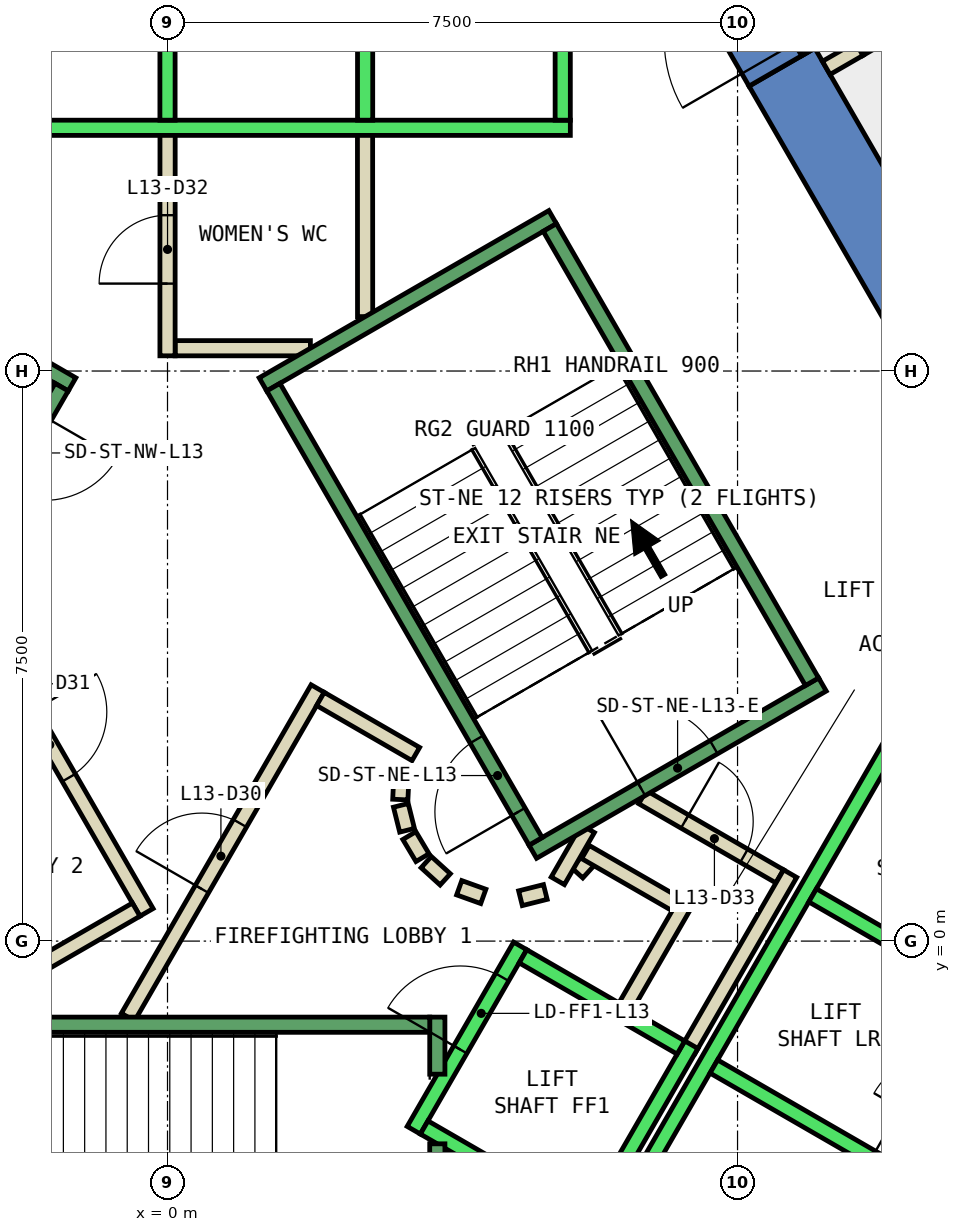
"""IFC4 building model, lengths in metres.
Left out: names, types, materials, properties, quantities, classifications, styles, units other than length and angle.
Written with IfcOpenShell. Run it as: python <this file> out.ifc"""

import sys

from ifc_helpers import new_model, si_unit, direction, frame, frame_2d, origin, place, context, subcontext, project, spatial, polyline, rectangle, outline, extrude, element, fill, save


model = new_model("IFC4")
c1 = context("Model", 3, precision=1e-05, world=origin(), true_north=direction((0.0, 1.0)))
c2 = subcontext(c1, "Body", "Model", "MODEL_VIEW")
j1 = project(units=[si_unit("LENGTHUNIT", "METRE"), si_unit("PLANEANGLEUNIT", "RADIAN")], contexts=[c1])
p1 = place(None, origin())
s1 = spatial("IfcSite", under=j1, at=p1, CompositionType="ELEMENT")
p2 = place(p1, origin())
s2 = spatial("IfcBuilding", under=s1, at=p2, CompositionType="ELEMENT")
p3 = place(p2, frame((0.0, 0.0, 64.4)))
s3 = spatial("IfcBuildingStorey", under=s2, at=p3, CompositionType="ELEMENT", Elevation=64.4)
p4 = place(p3, frame((0.0, 0.0, -0.4)))
e1 = element("IfcWall", 1, at=p4, inside=s3, PredefinedType="SHEAR", context=c2, shape_type="SweptSolid", body=[
    extrude(outline(polyline([(8.517, 11.748), (7.651, 11.248), (12.702, 2.5), (13.856, 2.5), (8.517, 11.748)])), origin(), (0.0, 0.0, 1.0), 4.2),
])
p5 = place(p3, frame((0.0, 0.0, 3.6)))
e2 = element("IfcWall", 2, at=p5, inside=s3, PredefinedType="SHEAR", context=c2, shape_type="SweptSolid", body=[
    extrude(outline(polyline([(7.517, 13.48), (6.651, 12.98), (7.651, 11.248), (8.517, 11.748), (7.517, 13.48)])), origin(), (0.0, 0.0, 1.0), 0.2),
])
p6 = place(p3, frame((0.0, 0.0, -0.4)))
e3 = element("IfcWall", 3, at=p6, inside=s3, PredefinedType="SHEAR", context=c2, shape_type="SweptSolid", body=[
    extrude(outline(polyline([(10.717, -2.937), (9.851, -2.437), (9.201, -3.563), (10.067, -4.063), (10.717, -2.937)])), origin(), (0.0, 0.0, 1.0), 4.2),
])
p7 = place(p3, frame((14.316, 14.75, 0.0), z_axis=(0.0, 0.0, 1.0), x_axis=(-0.865981716183, -0.500075661512, 0.0)))
e4 = element("IfcWall", 4, at=p7, inside=s3, PredefinedType="PARTITIONING", context=c2, shape_type="SweptSolid", body=[
    extrude(rectangle(XDim=6.023, YDim=0.2, at=frame_2d((3.011, 0.0))), origin(), (0.0, 0.0, 1.0), 3.8),
])
p8 = place(p7, frame((2.761, 0.0, 0.0)))
e5 = element("IfcOpeningElement", 5, at=p8, cuts=e4, PredefinedType="OPENING", context=c2, shape_type="SweptSolid", body=[
    extrude(rectangle(XDim=1.0, YDim=2.1, at=frame_2d((0.5, 1.05))), frame((0.0, 0.11, 0.0), z_axis=(0.0, -1.0, 0.0), x_axis=(1.0, 0.0, 0.0)), (0.0, 0.0, 1.0), 0.22),
])
p9 = place(p3, frame((1.88, 7.8, 0.0), z_axis=(0.0, 0.0, 1.0), x_axis=(-1.0, 0.0, 0.0)))
e6 = element("IfcWall", 6, at=p9, inside=s3, PredefinedType="PARTITIONING", context=c2, shape_type="SweptSolid", body=[
    extrude(rectangle(XDim=1.78, YDim=0.2, at=frame_2d((0.89, 0.0))), origin(), (0.0, 0.0, 1.0), 3.8),
])
p10 = place(p3, frame((0.0, 7.7, 0.0), z_axis=(0.0, 0.0, 1.0), x_axis=(0.000325520816, 0.999999947018, 0.0)))
e7 = element("IfcWall", 7, at=p10, inside=s3, PredefinedType="PARTITIONING", context=c2, shape_type="SweptSolid", body=[
    extrude(rectangle(XDim=3.0, YDim=0.2, at=frame_2d((1.5, 0.0))), origin(), (0.0, 0.0, 1.0), 3.8),
])
p11 = place(p10, frame((0.95, 0.0, 0.0)))
e8 = element("IfcOpeningElement", 8, at=p11, cuts=e7, PredefinedType="OPENING", context=c2, shape_type="SweptSolid", body=[
    extrude(rectangle(XDim=0.9, YDim=2.1, at=frame_2d((0.45, 1.05))), frame((0.0, 0.11, 0.0), z_axis=(0.0, -1.0, 0.0), x_axis=(1.0, 0.0, 0.0)), (0.0, 0.0, 1.0), 0.22),
])
p12 = place(p3, frame((2.599, 10.7, 0.0), z_axis=(0.0, 0.0, 1.0), x_axis=(0.000393159002, -0.999999922713, 0.0)))
e9 = element("IfcWall", 9, at=p12, inside=s3, PredefinedType="PARTITIONING", context=c2, shape_type="SweptSolid", body=[
    extrude(rectangle(XDim=2.484, YDim=0.2, at=frame_2d((1.242, 0.0))), origin(), (0.0, 0.0, 1.0), 3.8),
])
p13 = place(p3, frame((5.39, 0.898, 0.0), z_axis=(0.0, 0.0, 1.0), x_axis=(0.673828488714, 0.738887791073, 0.0)))
e10 = element("IfcWall", 10, at=p13, inside=s3, PredefinedType="PARTITIONING", context=c2, shape_type="SweptSolid", body=[
    extrude(rectangle(XDim=0.263, YDim=0.2, at=frame_2d((0.131, 0.0))), origin(), (0.0, 0.0, 1.0), 3.8),
])
p14 = place(p3, frame((5.499, 1.172, 0.0), z_axis=(0.0, 0.0, 1.0), x_axis=(0.866333505267, -0.499465972466, 0.0)))
e11 = element("IfcWall", 11, at=p14, inside=s3, PredefinedType="PARTITIONING", context=c2, shape_type="SweptSolid", body=[
    extrude(rectangle(XDim=1.374, YDim=0.2, at=frame_2d((0.687, 0.0))), origin(), (0.0, 0.0, 1.0), 3.8),
])
p15 = place(p3, frame((6.826, 0.522, 0.0), z_axis=(0.0, 0.0, 1.0), x_axis=(-0.500016722714, -0.866015748706, 0.0)))
e12 = element("IfcWall", 12, at=p15, inside=s3, PredefinedType="PARTITIONING", context=c2, shape_type="SweptSolid", body=[
    extrude(rectangle(XDim=1.7, YDim=0.2, at=frame_2d((0.85, 0.0))), origin(), (0.0, 0.0, 1.0), 3.8),
])
p16 = place(p3, frame((6.25, 1.894, 0.0), z_axis=(0.0, 0.0, 1.0), x_axis=(0.866043184279, -0.499969202016, 0.0)))
e13 = element("IfcWall", 13, at=p16, inside=s3, PredefinedType="PARTITIONING", context=c2, shape_type="SweptSolid", body=[
    extrude(rectangle(XDim=2.084, YDim=0.2, at=frame_2d((1.042, 0.0))), origin(), (0.0, 0.0, 1.0), 3.8),
])
p17 = place(p16, frame((0.642, 0.0, 0.0)))
e14 = element("IfcOpeningElement", 14, at=p17, cuts=e13, PredefinedType="OPENING", context=c2, shape_type="SweptSolid", body=[
    extrude(rectangle(XDim=0.9, YDim=2.1, at=frame_2d((0.45, 1.05))), frame((0.0, 0.11, 0.0), z_axis=(0.0, -1.0, 0.0), x_axis=(1.0, 0.0, 0.0)), (0.0, 0.0, 1.0), 0.22),
])
p18 = place(p3, frame((8.192, 0.888, 0.0), z_axis=(0.0, 0.0, 1.0), x_axis=(-0.499940625693, -0.866059680843, 0.0)))
e15 = element("IfcWall", 15, at=p18, inside=s3, PredefinedType="PARTITIONING", context=c2, shape_type="SweptSolid", body=[
    extrude(rectangle(XDim=2.68, YDim=0.2, at=frame_2d((1.34, 0.0))), origin(), (0.0, 0.0, 1.0), 3.8),
])
p19 = place(p3, frame((5.135, 0.793, 0.0), z_axis=(0.0, 0.0, 1.0), x_axis=(0.499526442893, 0.866298639529, 0.0)))
e16 = element("IfcWall", 16, at=p19, inside=s3, PredefinedType="PARTITIONING", context=c2, shape_type="SweptSolid", body=[
    extrude(rectangle(XDim=0.791, YDim=0.2, at=frame_2d((0.396, 0.0))), origin(), (0.0, 0.0, 1.0), 3.8),
])
p20 = place(p3, frame((-0.52, -1.0, 0.0), z_axis=(0.0, 0.0, 1.0), x_axis=(0.50011622646, 0.865958290007, 0.0)))
e17 = element("IfcWall", 17, at=p20, inside=s3, PredefinedType="PARTITIONING", context=c2, shape_type="SweptSolid", body=[
    extrude(rectangle(XDim=4.991, YDim=0.2, at=frame_2d((2.496, 0.0))), origin(), (0.0, 0.0, 1.0), 3.8),
])
p21 = place(p20, frame((1.945, 0.0, 0.0)))
e18 = element("IfcOpeningElement", 18, at=p21, cuts=e17, PredefinedType="OPENING", context=c2, shape_type="SweptSolid", body=[
    extrude(rectangle(XDim=1.0, YDim=2.1, at=frame_2d((0.5, 1.05))), frame((0.0, 0.11, 0.0), z_axis=(0.0, -1.0, 0.0), x_axis=(1.0, 0.0, 0.0)), (0.0, 0.0, 1.0), 0.22),
])
p22 = place(p3, frame((2.012, 3.186, 0.0), z_axis=(0.0, 0.0, 1.0), x_axis=(0.865891012941, -0.500232699559, 0.0)))
e19 = element("IfcWall", 19, at=p22, inside=s3, PredefinedType="PARTITIONING", context=c2, shape_type="SweptSolid", body=[
    extrude(rectangle(XDim=1.449, YDim=0.2, at=frame_2d((0.725, 0.0))), origin(), (0.0, 0.0, 1.0), 3.8),
])
p23 = place(p3, frame((3.079, 2.199, 0.0), z_axis=(0.0, 0.0, 1.0), x_axis=(-0.047771483479, -0.998858290933, 0.0)))
e20 = element("IfcWall", 20, at=p23, inside=s3, PredefinedType="PARTITIONING", context=c2, shape_type="SweptSolid", body=[
    extrude(rectangle(XDim=0.337, YDim=0.2, at=frame_2d((0.169, 0.0))), origin(), (0.0, 0.0, 1.0), 3.8),
])
p24 = place(p3, frame((3.07, 1.786, 0.0), z_axis=(0.0, 0.0, 1.0), x_axis=(0.242705583207, -0.970099994784, 0.0)))
e21 = element("IfcWall", 21, at=p24, inside=s3, PredefinedType="PARTITIONING", context=c2, shape_type="SweptSolid", body=[
    extrude(rectangle(XDim=0.338, YDim=0.2, at=frame_2d((0.169, 0.0))), origin(), (0.0, 0.0, 1.0), 3.8),
])
for number, where, z_axis, x_axis in (
    (22, (3.182, 1.388, 0.0), (0.0, 0.0, 1.0), (0.512, -0.859, 0.0)),
    (23, (3.404, 1.039, 0.0), (0.0, 0.0, 1.0), (0.74, -0.672, 0.0)),
):
    element("IfcWall", number, at=place(p3, frame(where, z_axis=z_axis, x_axis=x_axis)), inside=s3, PredefinedType="PARTITIONING", context=c2, shape_type="SweptSolid", body=[
        extrude(rectangle(XDim=0.338, YDim=0.2, at=frame_2d((0.169, 0.0))), origin(), (0.0, 0.0, 1.0), 3.8),
    ])
p25 = place(p3, frame((3.838, 0.702, 0.0), z_axis=(0.0, 0.0, 1.0), x_axis=(0.941035081519, -0.338308993895, 0.0)))
e24 = element("IfcWall", 24, at=p25, inside=s3, PredefinedType="PARTITIONING", context=c2, shape_type="SweptSolid", body=[
    extrude(rectangle(XDim=0.337, YDim=0.2, at=frame_2d((0.168, 0.0))), origin(), (0.0, 0.0, 1.0), 3.8),
])
p26 = place(p3, frame((4.644, 0.564, 0.0), z_axis=(0.0, 0.0, 1.0), x_axis=(0.969929076366, 0.243387729394, 0.0)))
e25 = element("IfcWall", 25, at=p26, inside=s3, PredefinedType="PARTITIONING", context=c2, shape_type="SweptSolid", body=[
    extrude(rectangle(XDim=0.337, YDim=0.2, at=frame_2d((0.168, 0.0))), origin(), (0.0, 0.0, 1.0), 3.8),
])
p27 = place(p3, frame((-2.771, 4.7, 0.0), z_axis=(0.0, 0.0, 1.0), x_axis=(0.499969479948, -0.866043023828, 0.0)))
e26 = element("IfcWall", 26, at=p27, inside=s3, PredefinedType="PARTITIONING", context=c2, shape_type="SweptSolid", body=[
    extrude(rectangle(XDim=4.99, YDim=0.2, at=frame_2d((2.495, 0.0))), origin(), (0.0, 0.0, 1.0), 3.8),
])
p28 = place(p27, frame((1.945, 0.0, 0.0)))
e27 = element("IfcOpeningElement", 27, at=p28, cuts=e26, PredefinedType="OPENING", context=c2, shape_type="SweptSolid", body=[
    extrude(rectangle(XDim=1.0, YDim=2.1, at=frame_2d((0.5, 1.05))), frame((0.0, 0.11, 0.0), z_axis=(0.0, -1.0, 0.0), x_axis=(1.0, 0.0, 0.0)), (0.0, 0.0, 1.0), 0.22),
])
p29 = place(p3, frame((-0.412, 0.414, 0.0), z_axis=(0.0, 0.0, 1.0), x_axis=(-0.866017369001, -0.500013916395, 0.0)))
e28 = element("IfcWall", 28, at=p29, inside=s3, PredefinedType="PARTITIONING", context=c2, shape_type="SweptSolid", body=[
    extrude(rectangle(XDim=1.45, YDim=0.2, at=frame_2d((0.725, 0.0))), origin(), (0.0, 0.0, 1.0), 3.8),
])
p30 = place(p3, frame((8.43, 11.698, 0.0), z_axis=(0.0, 0.0, 1.0), x_axis=(-0.50002537861, 0.866010750942, 0.0)))
e29 = element("IfcWall", 29, at=p30, inside=s3, PredefinedType="PARTITIONING", context=c2, shape_type="SweptSolid", body=[
    extrude(rectangle(XDim=2.0, YDim=0.2, at=frame_2d((1.0, 0.0))), origin(), (0.0, 0.0, 1.0), 2.4),
])
p31 = place(p30, frame((0.19, 0.0, 0.0)))
e30 = element("IfcOpeningElement", 30, at=p31, cuts=e29, PredefinedType="OPENING", context=c2, shape_type="SweptSolid", body=[
    extrude(rectangle(XDim=1.8, YDim=2.1, at=frame_2d((0.9, 1.05))), frame((0.0, 0.11, 0.0), z_axis=(0.0, -1.0, 0.0), x_axis=(1.0, 0.0, 0.0)), (0.0, 0.0, 1.0), 0.22),
])
p32 = place(p3, frame((9.1, 11.738, 0.0), z_axis=(0.0, 0.0, 1.0), x_axis=(-0.866071776036, -0.499919672301, 0.0)))
e31 = element("IfcWall", 31, at=p32, inside=s3, PredefinedType="PARTITIONING", context=c2, shape_type="SweptSolid", body=[
    extrude(rectangle(XDim=0.5, YDim=0.2, at=frame_2d((0.25, 0.0))), origin(), (0.0, 0.0, 1.0), 2.4),
])
p33 = place(p3, frame((5.3, 10.7, 0.0), z_axis=(0.0, 0.0, 1.0), x_axis=(-1.0, 0.0, 0.0)))
e32 = element("IfcWall", 32, at=p33, inside=s3, PredefinedType="STANDARD", context=c2, shape_type="SweptSolid", body=[
    extrude(rectangle(XDim=10.6, YDim=0.2, at=frame_2d((5.3, 0.0))), origin(), (0.0, 0.0, 1.0), 3.8),
])
for number, where, z_axis, x_axis in (
    (33, (5.2, 10.8, 0.0), (0.0, 0.0, 1.0), (0.0, 1.0, 0.0)),
    (34, (2.6, 10.8, 0.0), (0.0, 0.0, 1.0), (0.0, 1.0, 0.0)),
    (35, (0.0, 10.8, 0.0), (0.0, 0.0, 1.0), (0.0, 1.0, 0.0)),
):
    element("IfcWall", number, at=place(p3, frame(where, z_axis=z_axis, x_axis=x_axis)), inside=s3, PredefinedType="STANDARD", context=c2, shape_type="SweptSolid", body=[
        extrude(rectangle(XDim=2.5, YDim=0.2, at=frame_2d((1.25, 0.0))), origin(), (0.0, 0.0, 1.0), 3.8),
    ])
p34 = place(p3, frame((3.24, -2.488, 0.0), z_axis=(0.0, 0.0, 1.0), x_axis=(0.49994636267, 0.866056369097, 0.0)))
e36 = element("IfcWall", 36, at=p34, inside=s3, PredefinedType="STANDARD", context=c2, shape_type="SweptSolid", body=[
    extrude(rectangle(XDim=2.8, YDim=0.2, at=frame_2d((1.4, 0.0))), origin(), (0.0, 0.0, 1.0), 3.8),
])
p35 = place(p34, frame((1.225, 0.0, 0.0)))
e37 = element("IfcOpeningElement", 37, at=p35, cuts=e36, PredefinedType="OPENING", context=c2, shape_type="SweptSolid", body=[
    extrude(rectangle(XDim=1.1, YDim=2.1, at=frame_2d((0.55, 1.05))), frame((0.0, 0.11, 0.0), z_axis=(0.0, -1.0, 0.0), x_axis=(1.0, 0.0, 0.0)), (0.0, 0.0, 1.0), 0.22),
])
p36 = place(p3, frame((5.492, -3.788, 0.0), z_axis=(0.0, 0.0, 1.0), x_axis=(0.500011755427, 0.866018616679, 0.0)))
e38 = element("IfcWall", 38, at=p36, inside=s3, PredefinedType="STANDARD", context=c2, shape_type="SweptSolid", body=[
    extrude(rectangle(XDim=2.8, YDim=0.2, at=frame_2d((1.4, 0.0))), origin(), (0.0, 0.0, 1.0), 3.8),
])
p37 = place(p3, frame((3.377, -2.452, 0.0), z_axis=(0.0, 0.0, 1.0), x_axis=(0.865955154139, -0.50012165622, 0.0)))
e39 = element("IfcWall", 39, at=p37, inside=s3, PredefinedType="STANDARD", context=c2, shape_type="SweptSolid", body=[
    extrude(rectangle(XDim=2.4, YDim=0.2, at=frame_2d((1.2, 0.0))), origin(), (0.0, 0.0, 1.0), 3.8),
])
p38 = place(p3, frame((4.677, -0.2, 0.0), z_axis=(0.0, 0.0, 1.0), x_axis=(0.865973769406, -0.500089422704, 0.0)))
e40 = element("IfcWall", 40, at=p38, inside=s3, PredefinedType="STANDARD", context=c2, shape_type="SweptSolid", body=[
    extrude(rectangle(XDim=2.399, YDim=0.2, at=frame_2d((1.2, 0.0))), origin(), (0.0, 0.0, 1.0), 3.8),
])
p39 = place(p3, frame((4.451, -6.19, 0.0), z_axis=(0.0, 0.0, 1.0), x_axis=(0.50000090737, 0.866024879913, 0.0)))
e41 = element("IfcWall", 41, at=p39, inside=s3, PredefinedType="STANDARD", context=c2, shape_type="SweptSolid", body=[
    extrude(rectangle(XDim=10.6, YDim=0.2, at=frame_2d((5.3, 0.0))), origin(), (0.0, 0.0, 1.0), 3.8),
])
for number, where, z_axis, x_axis in (
    (42, (7.188, -1.65, 0.0), (0.0, 0.0, 1.0), (0.866, -0.5, 0.0)),
    (43, (8.488, 0.602, 0.0), (0.0, 0.0, 1.0), (0.866, -0.5, 0.0)),
):
    element("IfcWall", number, at=place(p3, frame(where, z_axis=z_axis, x_axis=x_axis)), inside=s3, PredefinedType="STANDARD", context=c2, shape_type="SweptSolid", body=[
        extrude(rectangle(XDim=2.5, YDim=0.2, at=frame_2d((1.25, 0.0))), origin(), (0.0, 0.0, 1.0), 3.8),
    ])
p40 = place(p3, frame((3.55, -2.667, 0.0), z_axis=(0.0, 0.0, 1.0), x_axis=(0.0, -1.0, 0.0)))
e44 = element("IfcWall", 44, at=p40, inside=s3, PredefinedType="STANDARD", context=c2, shape_type="SweptSolid", body=[
    extrude(rectangle(XDim=2.733, YDim=0.2, at=frame_2d((1.366, 0.0))), origin(), (0.0, 0.0, 1.0), 3.8),
])
p41 = place(p3, frame((3.55, -1.0, 0.0), z_axis=(0.0, 0.0, 1.0), x_axis=(0.0, -1.0, 0.0)))
e45 = element("IfcWall", 45, at=p41, inside=s3, PredefinedType="STANDARD", context=c2, shape_type="SweptSolid", body=[
    extrude(rectangle(XDim=0.751, YDim=0.2, at=frame_2d((0.375, 0.0))), origin(), (0.0, 0.0, 1.0), 3.8),
])
p42 = place(p3, frame((-3.45, -1.1, 0.0), z_axis=(0.0, 0.0, 1.0), x_axis=(1.0, 0.0, 0.0)))
e46 = element("IfcWall", 46, at=p42, inside=s3, PredefinedType="STANDARD", context=c2, shape_type="SweptSolid", body=[
    extrude(rectangle(XDim=6.9, YDim=0.2, at=frame_2d((3.45, 0.0))), origin(), (0.0, 0.0, 1.0), 3.8),
])
p43 = place(p42, frame((0.45, 0.0, 0.0)))
e47 = element("IfcOpeningElement", 47, at=p43, cuts=e46, PredefinedType="OPENING", context=c2, shape_type="SweptSolid", body=[
    extrude(rectangle(XDim=1.1, YDim=2.2, at=frame_2d((0.55, 1.1))), frame((0.0, 0.11, 0.0), z_axis=(0.0, -1.0, 0.0), x_axis=(1.0, 0.0, 0.0)), (0.0, 0.0, 1.0), 0.22),
])
p44 = place(p3, frame((4.806, 1.176, 0.0), z_axis=(0.0, 0.0, 1.0), x_axis=(0.866059941101, 0.499940174841, 0.0)))
e48 = element("IfcWall", 48, at=p44, inside=s3, PredefinedType="STANDARD", context=c2, shape_type="SweptSolid", body=[
    extrude(rectangle(XDim=4.4, YDim=0.2, at=frame_2d((2.2, 0.0))), origin(), (0.0, 0.0, 1.0), 3.8),
])
p45 = place(p44, frame((1.65, 0.0, 0.0)))
e49 = element("IfcOpeningElement", 49, at=p45, cuts=e48, PredefinedType="OPENING", context=c2, shape_type="SweptSolid", body=[
    extrude(rectangle(XDim=1.1, YDim=2.2, at=frame_2d((0.55, 1.1))), frame((0.0, 0.11, 0.0), z_axis=(0.0, -1.0, 0.0), x_axis=(1.0, 0.0, 0.0)), (0.0, 0.0, 1.0), 0.22),
])
p46 = place(p3, frame((1.256, 7.324, 0.0), z_axis=(0.0, 0.0, 1.0), x_axis=(0.866046073146, 0.499964197906, 0.0)))
e50 = element("IfcWall", 50, at=p46, inside=s3, PredefinedType="STANDARD", context=c2, shape_type="SweptSolid", body=[
    extrude(rectangle(XDim=4.4, YDim=0.2, at=frame_2d((2.2, 0.0))), origin(), (0.0, 0.0, 1.0), 3.8),
])
p47 = place(p3, frame((4.843, 1.312, 0.0), z_axis=(0.0, 0.0, 1.0), x_axis=(-0.499963383562, 0.866046543262, 0.0)))
e51 = element("IfcWall", 51, at=p47, inside=s3, PredefinedType="STANDARD", context=c2, shape_type="SweptSolid", body=[
    extrude(rectangle(XDim=6.9, YDim=0.2, at=frame_2d((3.45, 0.0))), origin(), (0.0, 0.0, 1.0), 3.8),
])
p48 = place(p47, frame((0.45, 0.0, 0.0)))
e52 = element("IfcOpeningElement", 52, at=p48, cuts=e51, PredefinedType="OPENING", context=c2, shape_type="SweptSolid", body=[
    extrude(rectangle(XDim=1.1, YDim=2.2, at=frame_2d((0.55, 1.1))), frame((0.0, 0.11, 0.0), z_axis=(0.0, -1.0, 0.0), x_axis=(1.0, 0.0, 0.0)), (0.0, 0.0, 1.0), 0.22),
])
p49 = place(p3, frame((8.48, 3.412, 0.0), z_axis=(0.0, 0.0, 1.0), x_axis=(-0.499978703459, 0.866037698999, 0.0)))
e53 = element("IfcWall", 53, at=p49, inside=s3, PredefinedType="STANDARD", context=c2, shape_type="SweptSolid", body=[
    extrude(rectangle(XDim=6.9, YDim=0.2, at=frame_2d((3.45, 0.0))), origin(), (0.0, 0.0, 1.0), 3.8),
])
p50 = place(p3, frame((-1.256, 7.324, 0.0), z_axis=(0.0, 0.0, 1.0), x_axis=(-0.866046073146, 0.499964197906, 0.0)))
e54 = element("IfcWall", 54, at=p50, inside=s3, PredefinedType="STANDARD", context=c2, shape_type="SweptSolid", body=[
    extrude(rectangle(XDim=4.4, YDim=0.2, at=frame_2d((2.2, 0.0))), origin(), (0.0, 0.0, 1.0), 3.8),
])
p51 = place(p50, frame((1.65, 0.0, 0.0)))
e55 = element("IfcOpeningElement", 55, at=p51, cuts=e54, PredefinedType="OPENING", context=c2, shape_type="SweptSolid", body=[
    extrude(rectangle(XDim=1.1, YDim=2.2, at=frame_2d((0.55, 1.1))), frame((0.0, 0.11, 0.0), z_axis=(0.0, -1.0, 0.0), x_axis=(1.0, 0.0, 0.0)), (0.0, 0.0, 1.0), 0.22),
])
p52 = place(p3, frame((-1.393, 7.288, 0.0), z_axis=(0.0, 0.0, 1.0), x_axis=(-0.499963383562, -0.866046543262, 0.0)))
e56 = element("IfcWall", 56, at=p52, inside=s3, PredefinedType="STANDARD", context=c2, shape_type="SweptSolid", body=[
    extrude(rectangle(XDim=6.9, YDim=0.2, at=frame_2d((3.45, 0.0))), origin(), (0.0, 0.0, 1.0), 3.8),
])
p53 = place(p52, frame((0.45, 0.0, 0.0)))
e57 = element("IfcOpeningElement", 57, at=p53, cuts=e56, PredefinedType="OPENING", context=c2, shape_type="SweptSolid", body=[
    extrude(rectangle(XDim=1.1, YDim=2.2, at=frame_2d((0.55, 1.1))), frame((0.0, 0.11, 0.0), z_axis=(0.0, -1.0, 0.0), x_axis=(1.0, 0.0, 0.0)), (0.0, 0.0, 1.0), 0.22),
])
p54 = place(p21, origin())
e58 = element("IfcDoor", 58, at=p54, inside=s3, OperationType="SINGLE_SWING_LEFT", PredefinedType="DOOR", context=c2, shape_type="SweptSolid", body=[
    extrude(rectangle(XDim=1.0, YDim=2.1, at=frame_2d((0.5, 1.05))), frame((0.0, 0.025, 0.0), z_axis=(0.0, -1.0, 0.0), x_axis=(1.0, 0.0, 0.0)), (0.0, 0.0, 1.0), 0.05),
])
fill(e18, e58)
p55 = place(p28, origin())
e59 = element("IfcDoor", 59, at=p55, inside=s3, OperationType="SINGLE_SWING_RIGHT", PredefinedType="DOOR", context=c2, shape_type="SweptSolid", body=[
    extrude(rectangle(XDim=1.0, YDim=2.1, at=frame_2d((0.5, 1.05))), frame((0.0, 0.025, 0.0), z_axis=(0.0, -1.0, 0.0), x_axis=(1.0, 0.0, 0.0)), (0.0, 0.0, 1.0), 0.05),
])
fill(e27, e59)
p56 = place(p11, origin())
e60 = element("IfcDoor", 60, at=p56, inside=s3, OperationType="SINGLE_SWING_RIGHT", PredefinedType="DOOR", context=c2, shape_type="SweptSolid", body=[
    extrude(rectangle(XDim=0.9, YDim=2.1, at=frame_2d((0.45, 1.05))), frame((0.0, 0.025, 0.0), z_axis=(0.0, -1.0, 0.0), x_axis=(1.0, 0.0, 0.0)), (0.0, 0.0, 1.0), 0.05),
])
fill(e8, e60)
p57 = place(p17, origin())
e61 = element("IfcDoor", 61, at=p57, inside=s3, OperationType="SINGLE_SWING_LEFT", PredefinedType="DOOR", context=c2, shape_type="SweptSolid", body=[
    extrude(rectangle(XDim=0.9, YDim=2.1, at=frame_2d((0.45, 1.05))), frame((0.0, 0.025, 0.0), z_axis=(0.0, -1.0, 0.0), x_axis=(1.0, 0.0, 0.0)), (0.0, 0.0, 1.0), 0.05),
])
fill(e14, e61)
p58 = place(p35, origin())
e62 = element("IfcDoor", 62, at=p58, inside=s3, OperationType="SLIDING_TO_LEFT", PredefinedType="DOOR", context=c2, shape_type="SweptSolid", body=[
    extrude(rectangle(XDim=1.1, YDim=2.1, at=frame_2d((0.55, 1.05))), frame((0.0, 0.025, 0.0), z_axis=(0.0, -1.0, 0.0), x_axis=(1.0, 0.0, 0.0)), (0.0, 0.0, 1.0), 0.05),
])
fill(e37, e62)
p59 = place(p48, origin())
e63 = element("IfcDoor", 63, at=p59, inside=s3, OperationType="SINGLE_SWING_LEFT", PredefinedType="DOOR", context=c2, shape_type="SweptSolid", body=[
    extrude(rectangle(XDim=1.1, YDim=2.2, at=frame_2d((0.55, 1.1))), frame((0.0, 0.025, 0.0), z_axis=(0.0, -1.0, 0.0), x_axis=(1.0, 0.0, 0.0)), (0.0, 0.0, 1.0), 0.05),
])
fill(e52, e63)
p60 = place(p45, origin())
e64 = element("IfcDoor", 64, at=p60, inside=s3, OperationType="SINGLE_SWING_LEFT", PredefinedType="DOOR", context=c2, shape_type="SweptSolid", body=[
    extrude(rectangle(XDim=1.1, YDim=2.2, at=frame_2d((0.55, 1.1))), frame((0.0, 0.025, 0.0), z_axis=(0.0, -1.0, 0.0), x_axis=(1.0, 0.0, 0.0)), (0.0, 0.0, 1.0), 0.05),
])
fill(e49, e64)
save(model, sys.argv[1])
